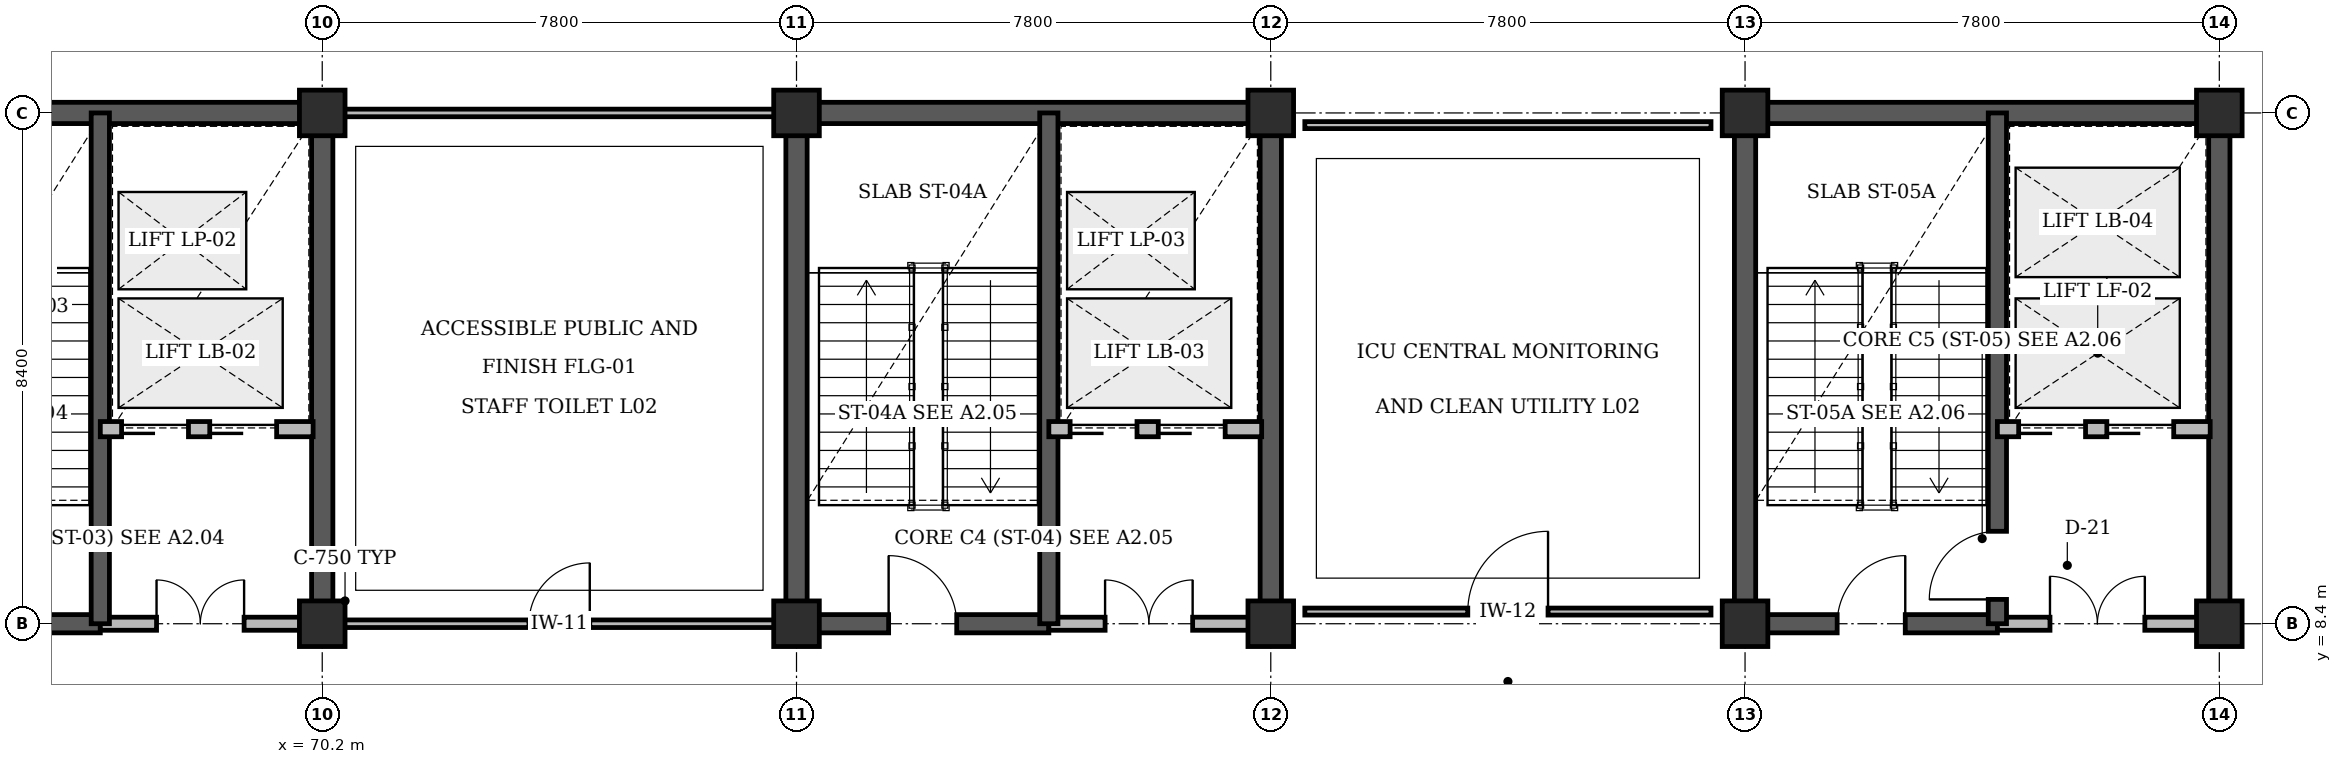
"""IFC4 building model, lengths in metres.
Left out: names, types, materials, properties, quantities, classifications, styles, units other than length and angle.
Written with IfcOpenShell. Run it as: python <this file> out.ifc"""

import sys

from ifc_helpers import new_model, si_unit, direction, frame, frame_2d, origin, origin_2d, place, context, subcontext, project, spatial, rectangle, extrude, element, fill, save


model = new_model("IFC4")
c1 = context("Model", 3, precision=1e-05, world=origin(), true_north=direction((0.0, 1.0)))
c2 = subcontext(c1, "Body", "Model", "MODEL_VIEW")
j1 = project(units=[si_unit("LENGTHUNIT", "METRE"), si_unit("PLANEANGLEUNIT", "RADIAN")], contexts=[c1])
p1 = place(None, origin())
s1 = spatial("IfcSite", under=j1, at=p1, CompositionType="ELEMENT")
p2 = place(p1, origin())
s2 = spatial("IfcBuilding", under=s1, at=p2, CompositionType="ELEMENT")
p3 = place(p2, frame((0.0, 0.0, 9.6)))
s3 = spatial("IfcBuildingStorey", under=s2, at=p3, CompositionType="ELEMENT", Elevation=9.6)
p4 = place(p3, frame((62.225, 16.8, 0.0), z_axis=(0.0, 0.0, 1.0), x_axis=(1.0, 0.0, 0.0)))
e1 = element("IfcWall", 1, at=p4, inside=s3, PredefinedType="SHEAR", context=c2, shape_type="SweptSolid", body=[
    extrude(rectangle(XDim=8.15, YDim=0.35, at=frame_2d((4.075, 0.0))), origin(), (0.0, 0.0, 1.0), 4.48),
])
p5 = place(p3, frame((70.2, 8.4, 0.0), z_axis=(0.0, 0.0, 1.0), x_axis=(0.0, 1.0, 0.0)))
e2 = element("IfcWall", 2, at=p5, inside=s3, PredefinedType="SHEAR", context=c2, shape_type="SweptSolid", body=[
    extrude(rectangle(XDim=8.4, YDim=0.35, at=frame_2d((4.2, 0.0))), origin(), (0.0, 0.0, 1.0), 4.48),
])
p6 = place(p3, frame((77.825, 16.8, 0.0), z_axis=(0.0, 0.0, 1.0), x_axis=(1.0, 0.0, 0.0)))
e3 = element("IfcWall", 3, at=p6, inside=s3, PredefinedType="SHEAR", context=c2, shape_type="SweptSolid", body=[
    extrude(rectangle(XDim=8.15, YDim=0.35, at=frame_2d((4.075, 0.0))), origin(), (0.0, 0.0, 1.0), 4.48),
])
for number, where, z_axis, x_axis in (
    (4, (78.0, 8.4, 0.0), (0.0, 0.0, 1.0), (0.0, 1.0, 0.0)),
    (5, (85.8, 8.4, 0.0), (0.0, 0.0, 1.0), (0.0, 1.0, 0.0)),
):
    element("IfcWall", number, at=place(p3, frame(where, z_axis=z_axis, x_axis=x_axis)), inside=s3, PredefinedType="SHEAR", context=c2, shape_type="SweptSolid", body=[
        extrude(rectangle(XDim=8.4, YDim=0.35, at=frame_2d((4.2, 0.0))), origin(), (0.0, 0.0, 1.0), 4.48),
    ])
p7 = place(p3, frame((93.425, 16.8, 0.0), z_axis=(0.0, 0.0, 1.0), x_axis=(1.0, 0.0, 0.0)))
e6 = element("IfcWall", 6, at=p7, inside=s3, PredefinedType="SHEAR", context=c2, shape_type="SweptSolid", body=[
    extrude(rectangle(XDim=8.15, YDim=0.35, at=frame_2d((4.075, 0.0))), origin(), (0.0, 0.0, 1.0), 4.48),
])
for number, where, z_axis, x_axis in (
    (7, (93.6, 8.4, 0.0), (0.0, 0.0, 1.0), (0.0, 1.0, 0.0)),
    (8, (101.4, 8.4, 0.0), (0.0, 0.0, 1.0), (0.0, 1.0, 0.0)),
):
    element("IfcWall", number, at=place(p3, frame(where, z_axis=z_axis, x_axis=x_axis)), inside=s3, PredefinedType="SHEAR", context=c2, shape_type="SweptSolid", body=[
        extrude(rectangle(XDim=8.4, YDim=0.35, at=frame_2d((4.2, 0.0))), origin(), (0.0, 0.0, 1.0), 4.48),
    ])
for number, where, z_axis, x_axis in (
    (9, (70.2, 8.4, 0.0), (0.0, 0.0, 1.0), (1.0, 0.0, 0.0)),
    (10, (70.2, 16.8, 0.0), (0.0, 0.0, 1.0), (1.0, 0.0, 0.0)),
    (11, (78.0, 8.4, 0.0), (0.0, 0.0, 1.0), (1.0, 0.0, 0.0)),
    (12, (78.0, 16.8, 0.0), (0.0, 0.0, 1.0), (1.0, 0.0, 0.0)),
    (13, (85.8, 8.4, 0.0), (0.0, 0.0, 1.0), (1.0, 0.0, 0.0)),
    (14, (85.8, 16.8, 0.0), (0.0, 0.0, 1.0), (1.0, 0.0, 0.0)),
    (15, (93.6, 8.4, 0.0), (0.0, 0.0, 1.0), (1.0, 0.0, 0.0)),
    (16, (93.6, 16.8, 0.0), (0.0, 0.0, 1.0), (1.0, 0.0, 0.0)),
    (17, (101.4, 8.4, 0.0), (0.0, 0.0, 1.0), (1.0, 0.0, 0.0)),
    (18, (101.4, 16.8, 0.0), (0.0, 0.0, 1.0), (1.0, 0.0, 0.0)),
):
    element("IfcColumn", number, at=place(p3, frame(where, z_axis=z_axis, x_axis=x_axis)), inside=s3, PredefinedType="COLUMN", context=c2, shape_type="SweptSolid", body=[
        extrude(rectangle(XDim=0.75, YDim=0.75, at=origin_2d()), origin(), (0.0, 0.0, 1.0), 4.8),
    ])
p8 = place(p3, frame((62.4, 8.4, 0.0), z_axis=(0.0, 0.0, 1.0), x_axis=(1.0, 0.0, 0.0)))
e19 = element("IfcWall", 19, at=p8, inside=s3, PredefinedType="SHEAR", context=c2, shape_type="SweptSolid", body=[
    extrude(rectangle(XDim=4.15, YDim=0.3, at=frame_2d((2.075, 0.0))), origin(), (0.0, 0.0, 1.0), 4.8),
])
p9 = place(p8, frame((1.515, 0.0, 0.0)))
e20 = element("IfcOpeningElement", 20, at=p9, cuts=e19, PredefinedType="OPENING", context=c2, shape_type="SweptSolid", body=[
    extrude(rectangle(XDim=1.12, YDim=2.15, at=frame_2d((0.56, 1.075))), frame((0.0, 0.16, 0.0), z_axis=(0.0, -1.0, 0.0), x_axis=(1.0, 0.0, 0.0)), (0.0, 0.0, 1.0), 0.32),
])
p10 = place(p3, frame((66.55, 8.4, 0.0), z_axis=(0.0, 0.0, 1.0), x_axis=(1.0, 0.0, 0.0)))
e21 = element("IfcWall", 21, at=p10, inside=s3, PredefinedType="STANDARD", context=c2, shape_type="SweptSolid", body=[
    extrude(rectangle(XDim=3.29, YDim=0.215, at=frame_2d((1.645, 0.0))), origin(), (0.0, 0.0, 1.0), 3.73),
])
p11 = place(p10, frame((0.925, 0.0, 0.0)))
e22 = element("IfcOpeningElement", 22, at=p11, cuts=e21, PredefinedType="OPENING", context=c2, shape_type="SweptSolid", body=[
    extrude(rectangle(XDim=1.44, YDim=2.2, at=frame_2d((0.72, 1.1))), frame((0.0, 0.118, 0.0), z_axis=(0.0, -1.0, 0.0), x_axis=(1.0, 0.0, 0.0)), (0.0, 0.0, 1.0), 0.235),
])
p12 = place(p3, frame((66.55, 8.4, 0.0), z_axis=(0.0, 0.0, 1.0), x_axis=(0.0, 1.0, 0.0)))
e23 = element("IfcWall", 23, at=p12, inside=s3, PredefinedType="SHEAR", context=c2, shape_type="SweptSolid", body=[
    extrude(rectangle(XDim=8.4, YDim=0.3, at=frame_2d((4.2, 0.0))), origin(), (0.0, 0.0, 1.0), 4.8),
])
p13 = place(p3, frame((66.55, 11.6, 0.0), z_axis=(0.0, 0.0, 1.0), x_axis=(1.0, 0.0, 0.0)))
e24 = element("IfcWall", 24, at=p13, inside=s3, PredefinedType="STANDARD", context=c2, shape_type="SweptSolid", body=[
    extrude(rectangle(XDim=3.5, YDim=0.25, at=frame_2d((1.75, 0.0))), origin(), (0.0, 0.0, 1.0), 4.46),
])
p14 = place(p13, frame((0.35, 0.0, 0.0)))
e25 = element("IfcOpeningElement", 25, at=p14, cuts=e24, PredefinedType="OPENING", context=c2, shape_type="SweptSolid", body=[
    extrude(rectangle(XDim=1.1, YDim=2.2, at=frame_2d((0.55, 1.1))), frame((0.0, 0.135, 0.0), z_axis=(0.0, -1.0, 0.0), x_axis=(1.0, 0.0, 0.0)), (0.0, 0.0, 1.0), 0.27),
])
p15 = place(p13, frame((1.8, 0.0, 0.0)))
e26 = element("IfcOpeningElement", 26, at=p15, cuts=e24, PredefinedType="OPENING", context=c2, shape_type="SweptSolid", body=[
    extrude(rectangle(XDim=1.1, YDim=2.2, at=frame_2d((0.55, 1.1))), frame((0.0, 0.135, 0.0), z_axis=(0.0, -1.0, 0.0), x_axis=(1.0, 0.0, 0.0)), (0.0, 0.0, 1.0), 0.27),
])
p16 = place(p3, frame((78.0, 8.4, 0.0), z_axis=(0.0, 0.0, 1.0), x_axis=(1.0, 0.0, 0.0)))
e27 = element("IfcWall", 27, at=p16, inside=s3, PredefinedType="SHEAR", context=c2, shape_type="SweptSolid", body=[
    extrude(rectangle(XDim=4.15, YDim=0.3, at=frame_2d((2.075, 0.0))), origin(), (0.0, 0.0, 1.0), 4.8),
])
p17 = place(p16, frame((1.515, 0.0, 0.0)))
e28 = element("IfcOpeningElement", 28, at=p17, cuts=e27, PredefinedType="OPENING", context=c2, shape_type="SweptSolid", body=[
    extrude(rectangle(XDim=1.12, YDim=2.15, at=frame_2d((0.56, 1.075))), frame((0.0, 0.16, 0.0), z_axis=(0.0, -1.0, 0.0), x_axis=(1.0, 0.0, 0.0)), (0.0, 0.0, 1.0), 0.32),
])
p18 = place(p3, frame((82.15, 8.4, 0.0), z_axis=(0.0, 0.0, 1.0), x_axis=(1.0, 0.0, 0.0)))
e29 = element("IfcWall", 29, at=p18, inside=s3, PredefinedType="STANDARD", context=c2, shape_type="SweptSolid", body=[
    extrude(rectangle(XDim=3.29, YDim=0.215, at=frame_2d((1.645, 0.0))), origin(), (0.0, 0.0, 1.0), 3.73),
])
p19 = place(p18, frame((0.925, 0.0, 0.0)))
e30 = element("IfcOpeningElement", 30, at=p19, cuts=e29, PredefinedType="OPENING", context=c2, shape_type="SweptSolid", body=[
    extrude(rectangle(XDim=1.44, YDim=2.2, at=frame_2d((0.72, 1.1))), frame((0.0, 0.118, 0.0), z_axis=(0.0, -1.0, 0.0), x_axis=(1.0, 0.0, 0.0)), (0.0, 0.0, 1.0), 0.235),
])
p20 = place(p3, frame((82.15, 8.4, 0.0), z_axis=(0.0, 0.0, 1.0), x_axis=(0.0, 1.0, 0.0)))
e31 = element("IfcWall", 31, at=p20, inside=s3, PredefinedType="SHEAR", context=c2, shape_type="SweptSolid", body=[
    extrude(rectangle(XDim=8.4, YDim=0.3, at=frame_2d((4.2, 0.0))), origin(), (0.0, 0.0, 1.0), 4.8),
])
p21 = place(p3, frame((82.15, 11.6, 0.0), z_axis=(0.0, 0.0, 1.0), x_axis=(1.0, 0.0, 0.0)))
e32 = element("IfcWall", 32, at=p21, inside=s3, PredefinedType="STANDARD", context=c2, shape_type="SweptSolid", body=[
    extrude(rectangle(XDim=3.5, YDim=0.25, at=frame_2d((1.75, 0.0))), origin(), (0.0, 0.0, 1.0), 4.46),
])
p22 = place(p21, frame((0.35, 0.0, 0.0)))
e33 = element("IfcOpeningElement", 33, at=p22, cuts=e32, PredefinedType="OPENING", context=c2, shape_type="SweptSolid", body=[
    extrude(rectangle(XDim=1.1, YDim=2.2, at=frame_2d((0.55, 1.1))), frame((0.0, 0.135, 0.0), z_axis=(0.0, -1.0, 0.0), x_axis=(1.0, 0.0, 0.0)), (0.0, 0.0, 1.0), 0.27),
])
p23 = place(p21, frame((1.8, 0.0, 0.0)))
e34 = element("IfcOpeningElement", 34, at=p23, cuts=e32, PredefinedType="OPENING", context=c2, shape_type="SweptSolid", body=[
    extrude(rectangle(XDim=1.1, YDim=2.2, at=frame_2d((0.55, 1.1))), frame((0.0, 0.135, 0.0), z_axis=(0.0, -1.0, 0.0), x_axis=(1.0, 0.0, 0.0)), (0.0, 0.0, 1.0), 0.27),
])
p24 = place(p3, frame((93.6, 8.4, 0.0), z_axis=(0.0, 0.0, 1.0), x_axis=(1.0, 0.0, 0.0)))
e35 = element("IfcWall", 35, at=p24, inside=s3, PredefinedType="SHEAR", context=c2, shape_type="SweptSolid", body=[
    extrude(rectangle(XDim=4.15, YDim=0.3, at=frame_2d((2.075, 0.0))), origin(), (0.0, 0.0, 1.0), 4.8),
])
p25 = place(p24, frame((1.515, 0.0, 0.0)))
e36 = element("IfcOpeningElement", 36, at=p25, cuts=e35, PredefinedType="OPENING", context=c2, shape_type="SweptSolid", body=[
    extrude(rectangle(XDim=1.12, YDim=2.15, at=frame_2d((0.56, 1.075))), frame((0.0, 0.16, 0.0), z_axis=(0.0, -1.0, 0.0), x_axis=(1.0, 0.0, 0.0)), (0.0, 0.0, 1.0), 0.32),
])
p26 = place(p3, frame((97.75, 8.4, 0.0), z_axis=(0.0, 0.0, 1.0), x_axis=(1.0, 0.0, 0.0)))
e37 = element("IfcWall", 37, at=p26, inside=s3, PredefinedType="STANDARD", context=c2, shape_type="SweptSolid", body=[
    extrude(rectangle(XDim=3.29, YDim=0.215, at=frame_2d((1.645, 0.0))), origin(), (0.0, 0.0, 1.0), 3.73),
])
p27 = place(p26, frame((0.865, 0.0, 0.0)))
e38 = element("IfcOpeningElement", 38, at=p27, cuts=e37, PredefinedType="OPENING", context=c2, shape_type="SweptSolid", body=[
    extrude(rectangle(XDim=1.56, YDim=2.2, at=frame_2d((0.78, 1.1))), frame((0.0, 0.118, 0.0), z_axis=(0.0, -1.0, 0.0), x_axis=(1.0, 0.0, 0.0)), (0.0, 0.0, 1.0), 0.235),
])
p28 = place(p3, frame((97.75, 8.4, 0.0), z_axis=(0.0, 0.0, 1.0), x_axis=(0.0, 1.0, 0.0)))
e39 = element("IfcWall", 39, at=p28, inside=s3, PredefinedType="SHEAR", context=c2, shape_type="SweptSolid", body=[
    extrude(rectangle(XDim=8.4, YDim=0.3, at=frame_2d((4.2, 0.0))), origin(), (0.0, 0.0, 1.0), 4.8),
])
p29 = place(p28, frame((0.4, 0.0, 0.0)))
e40 = element("IfcOpeningElement", 40, at=p29, cuts=e39, PredefinedType="OPENING", context=c2, shape_type="SweptSolid", body=[
    extrude(rectangle(XDim=1.12, YDim=2.15, at=frame_2d((0.56, 1.075))), frame((0.0, 0.16, 0.0), z_axis=(0.0, -1.0, 0.0), x_axis=(1.0, 0.0, 0.0)), (0.0, 0.0, 1.0), 0.32),
])
p30 = place(p3, frame((97.75, 11.6, 0.0), z_axis=(0.0, 0.0, 1.0), x_axis=(1.0, 0.0, 0.0)))
e41 = element("IfcWall", 41, at=p30, inside=s3, PredefinedType="STANDARD", context=c2, shape_type="SweptSolid", body=[
    extrude(rectangle(XDim=3.5, YDim=0.25, at=frame_2d((1.75, 0.0))), origin(), (0.0, 0.0, 1.0), 4.46),
])
p31 = place(p30, frame((0.35, 0.0, 0.0)))
e42 = element("IfcOpeningElement", 42, at=p31, cuts=e41, PredefinedType="OPENING", context=c2, shape_type="SweptSolid", body=[
    extrude(rectangle(XDim=1.1, YDim=2.2, at=frame_2d((0.55, 1.1))), frame((0.0, 0.135, 0.0), z_axis=(0.0, -1.0, 0.0), x_axis=(1.0, 0.0, 0.0)), (0.0, 0.0, 1.0), 0.27),
])
p32 = place(p30, frame((1.8, 0.0, 0.0)))
e43 = element("IfcOpeningElement", 43, at=p32, cuts=e41, PredefinedType="OPENING", context=c2, shape_type="SweptSolid", body=[
    extrude(rectangle(XDim=1.1, YDim=2.2, at=frame_2d((0.55, 1.1))), frame((0.0, 0.135, 0.0), z_axis=(0.0, -1.0, 0.0), x_axis=(1.0, 0.0, 0.0)), (0.0, 0.0, 1.0), 0.27),
])
p33 = place(p3, frame((70.56, 8.4, 0.0), z_axis=(0.0, 0.0, 1.0), x_axis=(1.0, 0.0, 0.0)))
e44 = element("IfcWall", 44, at=p33, inside=s3, PredefinedType="PARTITIONING", context=c2, shape_type="SweptSolid", body=[
    extrude(rectangle(XDim=7.08, YDim=0.125, at=frame_2d((3.54, 0.0))), origin(), (0.0, 0.0, 1.0), 3.73),
])
p34 = place(p33, frame((3.04, 0.0, 0.0)))
e45 = element("IfcOpeningElement", 45, at=p34, cuts=e44, PredefinedType="OPENING", context=c2, shape_type="SweptSolid", body=[
    extrude(rectangle(XDim=1.0, YDim=2.1, at=frame_2d((0.5, 1.05))), frame((0.0, 0.073, 0.0), z_axis=(0.0, -1.0, 0.0), x_axis=(1.0, 0.0, 0.0)), (0.0, 0.0, 1.0), 0.145),
])
p35 = place(p3, frame((70.56, 16.8, 0.0), z_axis=(0.0, 0.0, 1.0), x_axis=(1.0, 0.0, 0.0)))
e46 = element("IfcWall", 46, at=p35, inside=s3, PredefinedType="PARTITIONING", context=c2, shape_type="SweptSolid", body=[
    extrude(rectangle(XDim=7.08, YDim=0.125, at=frame_2d((3.54, 0.0))), origin(), (0.0, 0.0, 1.0), 3.73),
])
p36 = place(p3, frame((86.36, 8.6, 0.0), z_axis=(0.0, 0.0, 1.0), x_axis=(1.0, 0.0, 0.0)))
e47 = element("IfcWall", 47, at=p36, inside=s3, PredefinedType="PARTITIONING", context=c2, shape_type="SweptSolid", body=[
    extrude(rectangle(XDim=6.68, YDim=0.115, at=frame_2d((3.34, 0.0))), origin(), (0.0, 0.0, 1.0), 3.73),
])
p37 = place(p36, frame((2.68, 0.0, 0.0)))
e48 = element("IfcOpeningElement", 48, at=p37, cuts=e47, PredefinedType="OPENING", context=c2, shape_type="SweptSolid", body=[
    extrude(rectangle(XDim=1.32, YDim=2.15, at=frame_2d((0.66, 1.075))), frame((0.0, 0.067, 0.0), z_axis=(0.0, -1.0, 0.0), x_axis=(1.0, 0.0, 0.0)), (0.0, 0.0, 1.0), 0.135),
])
p38 = place(p3, frame((86.36, 16.6, 0.0), z_axis=(0.0, 0.0, 1.0), x_axis=(1.0, 0.0, 0.0)))
e49 = element("IfcWall", 49, at=p38, inside=s3, PredefinedType="PARTITIONING", context=c2, shape_type="SweptSolid", body=[
    extrude(rectangle(XDim=6.68, YDim=0.115, at=frame_2d((3.34, 0.0))), origin(), (0.0, 0.0, 1.0), 3.73),
])
p39 = place(p11, origin())
e50 = element("IfcDoor", 50, at=p39, inside=s3, OperationType="DOUBLE_DOOR_SINGLE_SWING", PredefinedType="DOOR", context=c2, shape_type="SweptSolid", body=[
    extrude(rectangle(XDim=1.44, YDim=2.2, at=frame_2d((0.72, 1.1))), frame((0.0, 0.025, 0.0), z_axis=(0.0, -1.0, 0.0), x_axis=(1.0, 0.0, 0.0)), (0.0, 0.0, 1.0), 0.05),
])
fill(e22, e50)
p40 = place(p14, origin())
e51 = element("IfcDoor", 51, at=p40, inside=s3, OperationType="SLIDING_TO_LEFT", PredefinedType="DOOR", context=c2, shape_type="SweptSolid", body=[
    extrude(rectangle(XDim=1.1, YDim=2.2, at=frame_2d((0.55, 1.1))), frame((0.0, 0.025, 0.0), z_axis=(0.0, -1.0, 0.0), x_axis=(1.0, 0.0, 0.0)), (0.0, 0.0, 1.0), 0.05),
])
fill(e25, e51)
p41 = place(p15, origin())
e52 = element("IfcDoor", 52, at=p41, inside=s3, OperationType="SLIDING_TO_LEFT", PredefinedType="DOOR", context=c2, shape_type="SweptSolid", body=[
    extrude(rectangle(XDim=1.1, YDim=2.2, at=frame_2d((0.55, 1.1))), frame((0.0, 0.025, 0.0), z_axis=(0.0, -1.0, 0.0), x_axis=(1.0, 0.0, 0.0)), (0.0, 0.0, 1.0), 0.05),
])
fill(e26, e52)
p42 = place(p17, origin())
e53 = element("IfcDoor", 53, at=p42, inside=s3, OperationType="SINGLE_SWING_LEFT", PredefinedType="DOOR", context=c2, shape_type="SweptSolid", body=[
    extrude(rectangle(XDim=1.12, YDim=2.15, at=frame_2d((0.56, 1.075))), frame((0.0, 0.025, 0.0), z_axis=(0.0, -1.0, 0.0), x_axis=(1.0, 0.0, 0.0)), (0.0, 0.0, 1.0), 0.05),
])
fill(e28, e53)
p43 = place(p19, origin())
e54 = element("IfcDoor", 54, at=p43, inside=s3, OperationType="DOUBLE_DOOR_SINGLE_SWING", PredefinedType="DOOR", context=c2, shape_type="SweptSolid", body=[
    extrude(rectangle(XDim=1.44, YDim=2.2, at=frame_2d((0.72, 1.1))), frame((0.0, 0.025, 0.0), z_axis=(0.0, -1.0, 0.0), x_axis=(1.0, 0.0, 0.0)), (0.0, 0.0, 1.0), 0.05),
])
fill(e30, e54)
p44 = place(p22, origin())
e55 = element("IfcDoor", 55, at=p44, inside=s3, OperationType="SLIDING_TO_LEFT", PredefinedType="DOOR", context=c2, shape_type="SweptSolid", body=[
    extrude(rectangle(XDim=1.1, YDim=2.2, at=frame_2d((0.55, 1.1))), frame((0.0, 0.025, 0.0), z_axis=(0.0, -1.0, 0.0), x_axis=(1.0, 0.0, 0.0)), (0.0, 0.0, 1.0), 0.05),
])
fill(e33, e55)
p45 = place(p23, origin())
e56 = element("IfcDoor", 56, at=p45, inside=s3, OperationType="SLIDING_TO_LEFT", PredefinedType="DOOR", context=c2, shape_type="SweptSolid", body=[
    extrude(rectangle(XDim=1.1, YDim=2.2, at=frame_2d((0.55, 1.1))), frame((0.0, 0.025, 0.0), z_axis=(0.0, -1.0, 0.0), x_axis=(1.0, 0.0, 0.0)), (0.0, 0.0, 1.0), 0.05),
])
fill(e34, e56)
p46 = place(p25, origin())
e57 = element("IfcDoor", 57, at=p46, inside=s3, OperationType="SINGLE_SWING_RIGHT", PredefinedType="DOOR", context=c2, shape_type="SweptSolid", body=[
    extrude(rectangle(XDim=1.12, YDim=2.15, at=frame_2d((0.56, 1.075))), frame((0.0, 0.025, 0.0), z_axis=(0.0, -1.0, 0.0), x_axis=(1.0, 0.0, 0.0)), (0.0, 0.0, 1.0), 0.05),
])
fill(e36, e57)
p47 = place(p27, origin())
e58 = element("IfcDoor", 58, at=p47, inside=s3, OperationType="DOUBLE_DOOR_SINGLE_SWING", PredefinedType="DOOR", context=c2, shape_type="SweptSolid", body=[
    extrude(rectangle(XDim=1.56, YDim=2.2, at=frame_2d((0.78, 1.1))), frame((0.0, 0.025, 0.0), z_axis=(0.0, -1.0, 0.0), x_axis=(1.0, 0.0, 0.0)), (0.0, 0.0, 1.0), 0.05),
])
fill(e38, e58)
p48 = place(p29, origin())
e59 = element("IfcDoor", 59, at=p48, inside=s3, OperationType="SINGLE_SWING_LEFT", PredefinedType="DOOR", context=c2, shape_type="SweptSolid", body=[
    extrude(rectangle(XDim=1.12, YDim=2.15, at=frame_2d((0.56, 1.075))), frame((0.0, 0.025, 0.0), z_axis=(0.0, -1.0, 0.0), x_axis=(1.0, 0.0, 0.0)), (0.0, 0.0, 1.0), 0.05),
])
fill(e40, e59)
p49 = place(p31, origin())
e60 = element("IfcDoor", 60, at=p49, inside=s3, OperationType="SLIDING_TO_LEFT", PredefinedType="DOOR", context=c2, shape_type="SweptSolid", body=[
    extrude(rectangle(XDim=1.1, YDim=2.2, at=frame_2d((0.55, 1.1))), frame((0.0, 0.025, 0.0), z_axis=(0.0, -1.0, 0.0), x_axis=(1.0, 0.0, 0.0)), (0.0, 0.0, 1.0), 0.05),
])
fill(e42, e60)
p50 = place(p32, origin())
e61 = element("IfcDoor", 61, at=p50, inside=s3, OperationType="SLIDING_TO_LEFT", PredefinedType="DOOR", context=c2, shape_type="SweptSolid", body=[
    extrude(rectangle(XDim=1.1, YDim=2.2, at=frame_2d((0.55, 1.1))), frame((0.0, 0.025, 0.0), z_axis=(0.0, -1.0, 0.0), x_axis=(1.0, 0.0, 0.0)), (0.0, 0.0, 1.0), 0.05),
])
fill(e43, e61)
p51 = place(p34, origin())
e62 = element("IfcDoor", 62, at=p51, inside=s3, OperationType="SINGLE_SWING_RIGHT", PredefinedType="DOOR", context=c2, shape_type="SweptSolid", body=[
    extrude(rectangle(XDim=1.0, YDim=2.1, at=frame_2d((0.5, 1.05))), frame((0.0, 0.025, 0.0), z_axis=(0.0, -1.0, 0.0), x_axis=(1.0, 0.0, 0.0)), (0.0, 0.0, 1.0), 0.05),
])
fill(e45, e62)
p52 = place(p37, origin())
e63 = element("IfcDoor", 63, at=p52, inside=s3, OperationType="SINGLE_SWING_RIGHT", PredefinedType="DOOR", context=c2, shape_type="SweptSolid", body=[
    extrude(rectangle(XDim=1.32, YDim=2.15, at=frame_2d((0.66, 1.075))), frame((0.0, 0.025, 0.0), z_axis=(0.0, -1.0, 0.0), x_axis=(1.0, 0.0, 0.0)), (0.0, 0.0, 1.0), 0.05),
])
fill(e48, e63)
save(model, sys.argv[1])
